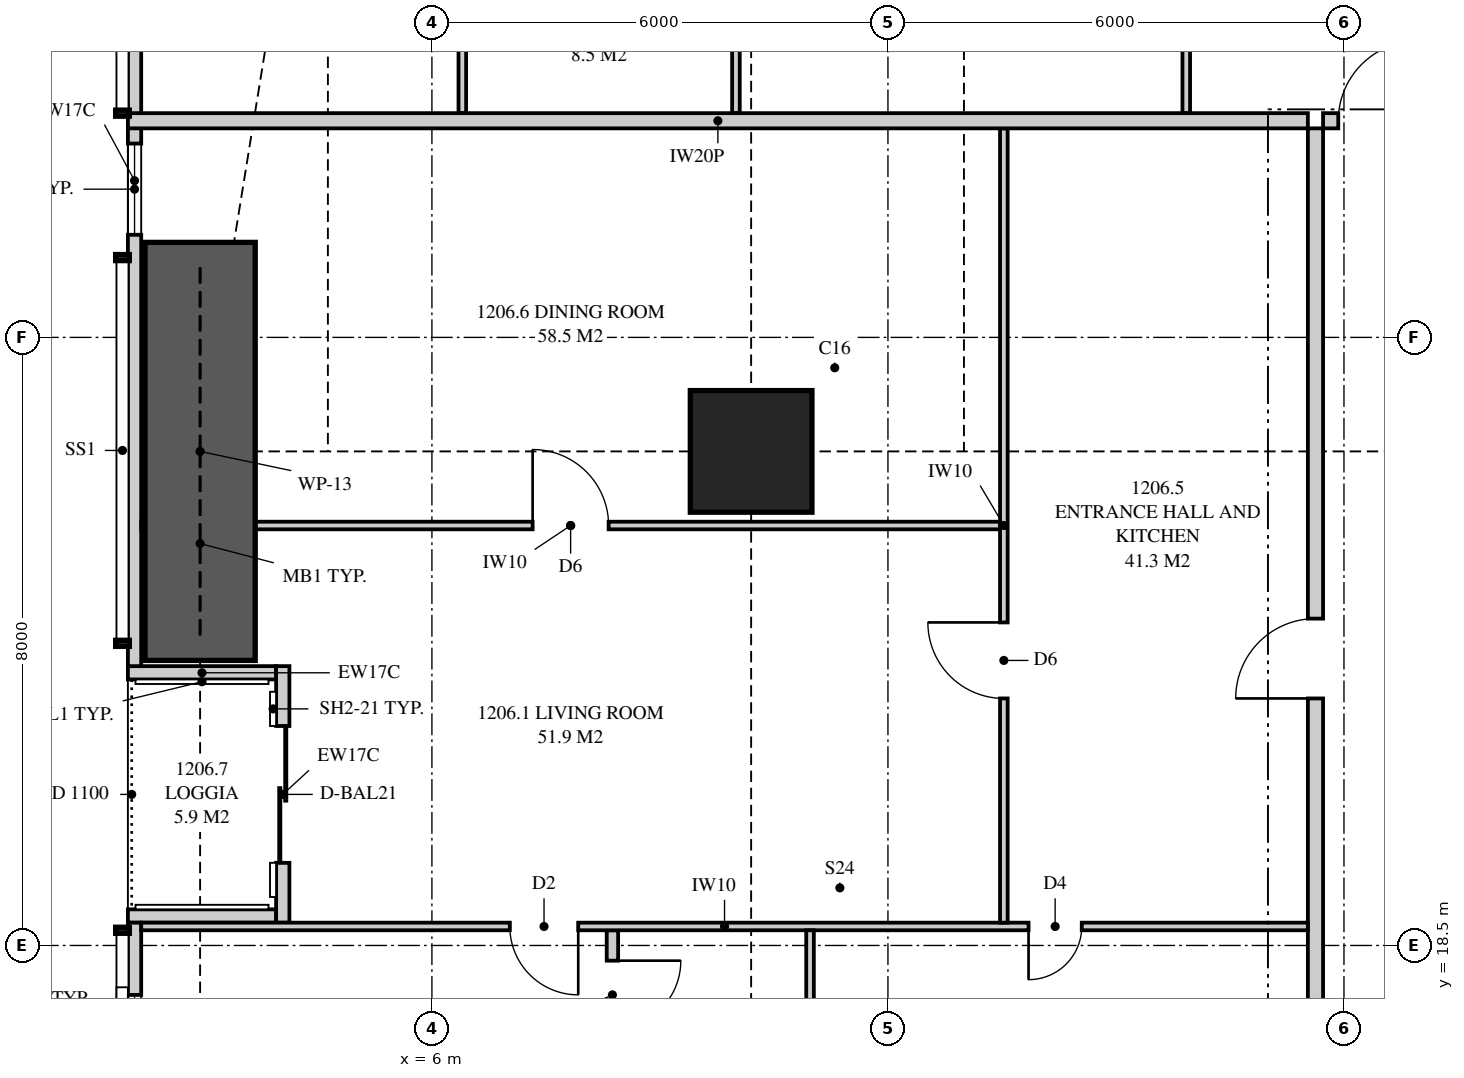
"""IFC4 building model, lengths in metres.
Left out: names, types, materials, properties, quantities, classifications, styles, units other than length and angle.
Written with IfcOpenShell. Run it as: python <this file> out.ifc"""

import sys

from ifc_helpers import new_model, si_unit, direction, frame, frame_2d, origin, origin_2d, place, context, subcontext, project, spatial, polyline, rectangle, outline, extrude, element, fill, save


model = new_model("IFC4")
c1 = context("Model", 3, precision=1e-05, world=origin(), true_north=direction((0.0, 1.0)))
c2 = subcontext(c1, "Body", "Model", "MODEL_VIEW")
j1 = project(units=[si_unit("LENGTHUNIT", "METRE"), si_unit("PLANEANGLEUNIT", "RADIAN")], contexts=[c1])
p1 = place(None, origin())
s1 = spatial("IfcSite", under=j1, at=p1, CompositionType="ELEMENT")
p2 = place(p1, origin())
s2 = spatial("IfcBuilding", under=s1, at=p2, CompositionType="ELEMENT")
p3 = place(p2, frame((0.0, 0.0, 47.8)))
s3 = spatial("IfcBuildingStorey", under=s2, at=p3, CompositionType="ELEMENT", Elevation=47.8)
p4 = place(p3, frame((10.2, 25.0, 0.0), z_axis=(0.0, 0.0, 1.0), x_axis=(1.0, 0.0, 0.0)))
e1 = element("IfcColumn", 1, at=p4, inside=s3, PredefinedType="COLUMN", context=c2, shape_type="SweptSolid", body=[
    extrude(rectangle(XDim=1.6, YDim=1.6, at=origin_2d()), origin(), (0.0, 0.0, 1.0), 3.35),
])
p5 = place(p3, frame((2.087, 34.949, 0.0), z_axis=(0.0, 0.0, 1.0), x_axis=(0.0, -1.0, 0.0)))
e2 = element("IfcWall", 2, at=p5, inside=s3, PredefinedType="SOLIDWALL", context=c2, shape_type="SweptSolid", body=[
    extrude(outline(polyline([(0.0, 0.0), (12.774, 0.0), (12.774, 2.15), (9.949, 2.15), (9.949, 3.11), (9.823, 3.11), (9.823, 2.15), (9.73, 2.15), (9.73, 3.11), (0.0, 3.11), (0.0, 0.0)])), frame((0.0, 0.087, 0.0), z_axis=(0.0, -1.0, 0.0), x_axis=(1.0, 0.0, 0.0)), (0.0, 0.0, 1.0), 0.175),
])
p6 = place(p5, frame((2.722, 0.0, 0.4)))
e3 = element("IfcOpeningElement", 3, at=p6, cuts=e2, PredefinedType="OPENING", context=c2, shape_type="SweptSolid", body=[
    extrude(rectangle(XDim=1.8, YDim=1.7, at=frame_2d((0.9, 0.85))), frame((0.0, 0.097, 0.0), z_axis=(0.0, -1.0, 0.0), x_axis=(1.0, 0.0, 0.0)), (0.0, 0.0, 1.0), 0.195),
])
p7 = place(p5, frame((5.899, 0.0, 0.4)))
e4 = element("IfcOpeningElement", 4, at=p7, cuts=e2, PredefinedType="OPENING", context=c2, shape_type="SweptSolid", body=[
    extrude(rectangle(XDim=1.2, YDim=1.7, at=frame_2d((0.6, 0.85))), frame((0.0, 0.097, 0.0), z_axis=(0.0, -1.0, 0.0), x_axis=(1.0, 0.0, 0.0)), (0.0, 0.0, 1.0), 0.195),
])
p8 = place(p3, frame((2.087, 18.8, 0.0), z_axis=(0.0, 0.0, 1.0), x_axis=(0.0, -1.0, 0.0)))
e5 = element("IfcWall", 5, at=p8, inside=s3, PredefinedType="SOLIDWALL", context=c2, shape_type="SweptSolid", body=[
    extrude(outline(polyline([(0.0, 0.0), (15.749, 0.0), (15.749, 3.11), (6.019, 3.11), (6.019, 2.15), (5.926, 2.15), (5.926, 3.11), (5.8, 3.11), (5.8, 2.15), (0.0, 2.15), (0.0, 0.0)])), frame((0.0, 0.087, 0.0), z_axis=(0.0, -1.0, 0.0), x_axis=(1.0, 0.0, 0.0)), (0.0, 0.0, 1.0), 0.175),
])
p9 = place(p8, frame((0.95, 0.0, 0.4)))
e6 = element("IfcOpeningElement", 6, at=p9, cuts=e5, PredefinedType="OPENING", context=c2, shape_type="SweptSolid", body=[
    extrude(rectangle(XDim=1.8, YDim=1.7, at=frame_2d((0.9, 0.85))), frame((0.0, 0.097, 0.0), z_axis=(0.0, -1.0, 0.0), x_axis=(1.0, 0.0, 0.0)), (0.0, 0.0, 1.0), 0.195),
])
p10 = place(p8, frame((8.69, 0.0, 0.4)))
e7 = element("IfcOpeningElement", 7, at=p10, cuts=e5, PredefinedType="OPENING", context=c2, shape_type="SweptSolid", body=[
    extrude(rectangle(XDim=1.2, YDim=1.7, at=frame_2d((0.6, 0.85))), frame((0.0, 0.097, 0.0), z_axis=(0.0, -1.0, 0.0), x_axis=(1.0, 0.0, 0.0)), (0.0, 0.0, 1.0), 0.195),
])
p11 = place(p8, frame((11.727, 0.0, 0.4)))
e8 = element("IfcOpeningElement", 8, at=p11, cuts=e5, PredefinedType="OPENING", context=c2, shape_type="SweptSolid", body=[
    extrude(rectangle(XDim=1.8, YDim=1.7, at=frame_2d((0.9, 0.85))), frame((0.0, 0.097, 0.0), z_axis=(0.0, -1.0, 0.0), x_axis=(1.0, 0.0, 0.0)), (0.0, 0.0, 1.0), 0.195),
])
p12 = place(p3, frame((4.038, 22.175, 0.0), z_axis=(0.0, 0.0, 1.0), x_axis=(0.0, -1.0, 0.0)))
e9 = element("IfcWall", 9, at=p12, inside=s3, PredefinedType="SOLIDWALL", context=c2, shape_type="SweptSolid", body=[
    extrude(rectangle(XDim=3.375, YDim=0.175, at=frame_2d((1.688, 0.0))), origin(), (0.0, 0.0, 1.0), 3.11),
])
p13 = place(p12, frame((0.788, 0.0, 0.0)))
e10 = element("IfcOpeningElement", 10, at=p13, cuts=e9, PredefinedType="OPENING", context=c2, shape_type="SweptSolid", body=[
    extrude(rectangle(XDim=1.8, YDim=2.1, at=frame_2d((0.9, 1.05))), frame((0.0, 0.097, 0.0), z_axis=(0.0, -1.0, 0.0), x_axis=(1.0, 0.0, 0.0)), (0.0, 0.0, 1.0), 0.195),
])
for number, where, z_axis, x_axis in (
    (11, (2.0, 22.087, 0.0), (0.0, 0.0, 1.0), (1.0, 0.0, 0.0)),
    (12, (2.0, 18.887, 0.0), (0.0, 0.0, 1.0), (1.0, 0.0, 0.0)),
):
    element("IfcWall", number, at=place(p3, frame(where, z_axis=z_axis, x_axis=x_axis)), inside=s3, PredefinedType="SOLIDWALL", context=c2, shape_type="SweptSolid", body=[
        extrude(outline(polyline([(0.0, 0.0), (1.95, 0.0), (1.95, 3.11), (1.75, 3.11), (1.75, 2.15), (0.15, 2.15), (0.15, 3.11), (0.0, 3.11), (0.0, 0.0)])), frame((0.0, 0.087, 0.0), z_axis=(0.0, -1.0, 0.0), x_axis=(1.0, 0.0, 0.0)), (0.0, 0.0, 1.0), 0.175),
    ])
p14 = place(p3, frame((17.725, 29.35, 0.0), z_axis=(0.0, 0.0, 1.0), x_axis=(1.0, 0.0, 0.0)))
e13 = element("IfcWall", 13, at=p14, inside=s3, PredefinedType="PARTITIONING", context=c2, shape_type="SweptSolid", body=[
    extrude(rectangle(XDim=4.075, YDim=0.2, at=frame_2d((2.038, 0.0))), origin(), (0.0, 0.0, 1.0), 3.11),
])
p15 = place(p14, frame((0.2, 0.0, 0.0)))
e14 = element("IfcOpeningElement", 14, at=p15, cuts=e13, PredefinedType="OPENING", context=c2, shape_type="SweptSolid", body=[
    extrude(rectangle(XDim=1.05, YDim=2.2, at=frame_2d((0.525, 1.1))), frame((0.0, 0.11, 0.0), z_axis=(0.0, -1.0, 0.0), x_axis=(1.0, 0.0, 0.0)), (0.0, 0.0, 1.0), 0.22),
])
p16 = place(p3, frame((6.4, 37.825, 0.0), z_axis=(0.0, 0.0, 1.0), x_axis=(0.0, -1.0, 0.0)))
e15 = element("IfcWall", 15, at=p16, inside=s3, PredefinedType="PARTITIONING", context=c2, shape_type="SweptSolid", body=[
    extrude(outline(polyline([(0.0, 0.0), (8.375, 0.0), (8.375, 3.11), (2.978, 3.11), (2.978, 2.15), (1.224, 2.15), (1.224, 3.11), (0.0, 3.11), (0.0, 0.0)])), frame((0.0, 0.05, 0.0), z_axis=(0.0, -1.0, 0.0), x_axis=(1.0, 0.0, 0.0)), (0.0, 0.0, 1.0), 0.1),
])
p17 = place(p16, frame((3.422, 0.0, 0.0)))
e16 = element("IfcOpeningElement", 16, at=p17, cuts=e15, PredefinedType="OPENING", context=c2, shape_type="SweptSolid", body=[
    extrude(rectangle(XDim=0.9, YDim=2.1, at=frame_2d((0.45, 1.05))), frame((0.0, 0.06, 0.0), z_axis=(0.0, -1.0, 0.0), x_axis=(1.0, 0.0, 0.0)), (0.0, 0.0, 1.0), 0.12),
])
p18 = place(p16, frame((6.023, 0.0, 0.0)))
e17 = element("IfcOpeningElement", 17, at=p18, cuts=e15, PredefinedType="OPENING", context=c2, shape_type="SweptSolid", body=[
    extrude(rectangle(XDim=0.9, YDim=2.1, at=frame_2d((0.45, 1.05))), frame((0.0, 0.06, 0.0), z_axis=(0.0, -1.0, 0.0), x_axis=(1.0, 0.0, 0.0)), (0.0, 0.0, 1.0), 0.12),
])
p19 = place(p3, frame((10.0, 36.487, 0.0), z_axis=(0.0, 0.0, 1.0), x_axis=(0.0, -1.0, 0.0)))
e18 = element("IfcWall", 18, at=p19, inside=s3, PredefinedType="PARTITIONING", context=c2, shape_type="SweptSolid", body=[
    extrude(outline(polyline([(0.0, 0.0), (7.037, 0.0), (7.037, 2.51), (0.917, 2.51), (0.917, 2.15), (0.0, 2.15), (0.0, 0.0)])), frame((0.0, 0.05, 0.0), z_axis=(0.0, -1.0, 0.0), x_axis=(1.0, 0.0, 0.0)), (0.0, 0.0, 1.0), 0.1),
])
p20 = place(p19, frame((3.188, 0.0, 0.0)))
e19 = element("IfcOpeningElement", 19, at=p20, cuts=e18, PredefinedType="OPENING", context=c2, shape_type="SweptSolid", body=[
    extrude(rectangle(XDim=0.9, YDim=2.1, at=frame_2d((0.45, 1.05))), frame((0.0, 0.06, 0.0), z_axis=(0.0, -1.0, 0.0), x_axis=(1.0, 0.0, 0.0)), (0.0, 0.0, 1.0), 0.12),
])
p21 = place(p19, frame((4.612, 0.0, 0.0)))
e20 = element("IfcOpeningElement", 20, at=p21, cuts=e18, PredefinedType="OPENING", context=c2, shape_type="SweptSolid", body=[
    extrude(rectangle(XDim=0.9, YDim=2.1, at=frame_2d((0.45, 1.05))), frame((0.0, 0.06, 0.0), z_axis=(0.0, -1.0, 0.0), x_axis=(1.0, 0.0, 0.0)), (0.0, 0.0, 1.0), 0.12),
])
p22 = place(p3, frame((15.925, 37.825, 0.0), z_axis=(0.0, 0.0, 1.0), x_axis=(0.0, -1.0, 0.0)))
e21 = element("IfcWall", 21, at=p22, inside=s3, PredefinedType="PARTITIONING", context=c2, shape_type="SweptSolid", body=[
    extrude(outline(polyline([(0.0, 0.0), (8.375, 0.0), (8.375, 3.11), (1.635, 3.11), (1.635, 2.15), (0.0, 2.15), (0.0, 3.11), (0.0, 0.0)])), frame((0.0, 0.05, 0.0), z_axis=(0.0, -1.0, 0.0), x_axis=(1.0, 0.0, 0.0)), (0.0, 0.0, 1.0), 0.1),
])
p23 = place(p22, frame((3.688, 0.0, 0.0)))
e22 = element("IfcOpeningElement", 22, at=p23, cuts=e21, PredefinedType="OPENING", context=c2, shape_type="SweptSolid", body=[
    extrude(rectangle(XDim=1.0, YDim=2.1, at=frame_2d((0.5, 1.05))), frame((0.0, 0.06, 0.0), z_axis=(0.0, -1.0, 0.0), x_axis=(1.0, 0.0, 0.0)), (0.0, 0.0, 1.0), 0.12),
])
p24 = place(p3, frame((2.0, 29.35, 0.0), z_axis=(0.0, 0.0, 1.0), x_axis=(1.0, 0.0, 0.0)))
e23 = element("IfcWall", 23, at=p24, inside=s3, PredefinedType="PARTITIONING", context=c2, shape_type="SweptSolid", body=[
    extrude(outline(polyline([(0.0, 0.0), (15.525, 0.0), (15.525, 3.11), (11.337, 3.11), (11.337, 2.541), (10.663, 2.541), (10.663, 3.11), (9.51, 3.11), (9.51, 2.51), (6.89, 2.51), (6.89, 3.11), (2.969, 3.11), (2.969, 2.541), (2.577, 2.541), (2.577, 2.15), (0.733, 2.15), (0.733, 3.11), (0.0, 3.11), (0.0, 0.0)])), frame((0.0, 0.1, 0.0), z_axis=(0.0, -1.0, 0.0), x_axis=(1.0, 0.0, 0.0)), (0.0, 0.0, 1.0), 0.2),
])
p25 = place(p3, frame((17.625, 15.25, 0.0), z_axis=(0.0, 0.0, 1.0), x_axis=(0.0, 1.0, 0.0)))
e24 = element("IfcWall", 24, at=p25, inside=s3, PredefinedType="PARTITIONING", context=c2, shape_type="SweptSolid", body=[
    extrude(outline(polyline([(0.0, 0.0), (14.0, 0.0), (14.0, 3.11), (10.087, 3.11), (10.087, 2.541), (9.413, 2.541), (9.413, 3.11), (0.0, 3.11), (0.0, 0.0)])), frame((0.0, 0.1, 0.0), z_axis=(0.0, -1.0, 0.0), x_axis=(1.0, 0.0, 0.0)), (0.0, 0.0, 1.0), 0.2),
])
p26 = place(p25, frame((6.5, 0.0, 0.0)))
e25 = element("IfcOpeningElement", 25, at=p26, cuts=e24, PredefinedType="OPENING", context=c2, shape_type="SweptSolid", body=[
    extrude(rectangle(XDim=1.05, YDim=2.2, at=frame_2d((0.525, 1.1))), frame((0.0, 0.11, 0.0), z_axis=(0.0, -1.0, 0.0), x_axis=(1.0, 0.0, 0.0)), (0.0, 0.0, 1.0), 0.22),
])
p27 = place(p3, frame((2.175, 18.75, 0.0), z_axis=(0.0, 0.0, 1.0), x_axis=(1.0, 0.0, 0.0)))
e26 = element("IfcWall", 26, at=p27, inside=s3, PredefinedType="PARTITIONING", context=c2, shape_type="SweptSolid", body=[
    extrude(outline(polyline([(0.0, 0.0), (15.35, 0.0), (15.35, 3.11), (9.285, 3.11), (9.285, 2.51), (6.765, 2.51), (6.765, 3.11), (1.635, 3.11), (1.635, 2.15), (0.0, 2.15), (0.0, 3.11), (0.0, 0.0)])), frame((0.0, 0.05, 0.0), z_axis=(0.0, -1.0, 0.0), x_axis=(1.0, 0.0, 0.0)), (0.0, 0.0, 1.0), 0.1),
])
p28 = place(p27, frame((4.85, 0.0, 0.0)))
e27 = element("IfcOpeningElement", 27, at=p28, cuts=e26, PredefinedType="OPENING", context=c2, shape_type="SweptSolid", body=[
    extrude(rectangle(XDim=0.9, YDim=2.1, at=frame_2d((0.45, 1.05))), frame((0.0, 0.06, 0.0), z_axis=(0.0, -1.0, 0.0), x_axis=(1.0, 0.0, 0.0)), (0.0, 0.0, 1.0), 0.12),
])
p29 = place(p27, frame((11.675, 0.0, 0.0)))
e28 = element("IfcOpeningElement", 28, at=p29, cuts=e26, PredefinedType="OPENING", context=c2, shape_type="SweptSolid", body=[
    extrude(rectangle(XDim=0.7, YDim=2.1, at=frame_2d((0.35, 1.05))), frame((0.0, 0.06, 0.0), z_axis=(0.0, -1.0, 0.0), x_axis=(1.0, 0.0, 0.0)), (0.0, 0.0, 1.0), 0.12),
])
p30 = place(p3, frame((8.375, 15.25, 0.0), z_axis=(0.0, 0.0, 1.0), x_axis=(0.0, 1.0, 0.0)))
e29 = element("IfcWall", 29, at=p30, inside=s3, PredefinedType="PLUMBINGWALL", context=c2, shape_type="SweptSolid", body=[
    extrude(rectangle(XDim=3.45, YDim=0.15, at=frame_2d((1.725, 0.0))), origin(), (0.0, 0.0, 1.0), 3.11),
])
p31 = place(p30, frame((2.15, 0.0, 0.0)))
e30 = element("IfcOpeningElement", 30, at=p31, cuts=e29, PredefinedType="OPENING", context=c2, shape_type="SweptSolid", body=[
    extrude(rectangle(XDim=0.9, YDim=2.1, at=frame_2d((0.45, 1.05))), frame((0.0, 0.085, 0.0), z_axis=(0.0, -1.0, 0.0), x_axis=(1.0, 0.0, 0.0)), (0.0, 0.0, 1.0), 0.17),
])
p32 = place(p3, frame((10.975, 15.25, 0.0), z_axis=(0.0, 0.0, 1.0), x_axis=(0.0, 1.0, 0.0)))
e31 = element("IfcWall", 31, at=p32, inside=s3, PredefinedType="PARTITIONING", context=c2, shape_type="SweptSolid", body=[
    extrude(outline(polyline([(0.0, 0.0), (3.45, 0.0), (3.45, 3.11), (3.45, 2.51), (0.0, 2.51), (0.0, 3.11), (0.0, 0.0)])), frame((0.0, 0.05, 0.0), z_axis=(0.0, -1.0, 0.0), x_axis=(1.0, 0.0, 0.0)), (0.0, 0.0, 1.0), 0.1),
])
p33 = place(p3, frame((13.525, 18.8, 0.0), z_axis=(0.0, 0.0, 1.0), x_axis=(0.0, 1.0, 0.0)))
e32 = element("IfcWall", 32, at=p33, inside=s3, PredefinedType="PARTITIONING", context=c2, shape_type="SweptSolid", body=[
    extrude(outline(polyline([(0.0, 0.0), (10.45, 0.0), (10.45, 3.11), (6.487, 3.11), (6.487, 2.541), (5.913, 2.541), (5.913, 3.11), (0.0, 3.11), (0.0, 0.0)])), frame((0.0, 0.05, 0.0), z_axis=(0.0, -1.0, 0.0), x_axis=(1.0, 0.0, 0.0)), (0.0, 0.0, 1.0), 0.1),
])
p34 = place(p33, frame((2.95, 0.0, 0.0)))
e33 = element("IfcOpeningElement", 33, at=p34, cuts=e32, PredefinedType="OPENING", context=c2, shape_type="SweptSolid", body=[
    extrude(rectangle(XDim=1.0, YDim=2.1, at=frame_2d((0.5, 1.05))), frame((0.0, 0.06, 0.0), z_axis=(0.0, -1.0, 0.0), x_axis=(1.0, 0.0, 0.0)), (0.0, 0.0, 1.0), 0.12),
])
p35 = place(p3, frame((2.175, 24.025, 0.0), z_axis=(0.0, 0.0, 1.0), x_axis=(1.0, 0.0, 0.0)))
e34 = element("IfcWall", 34, at=p35, inside=s3, PredefinedType="PARTITIONING", context=c2, shape_type="SweptSolid", body=[
    extrude(outline(polyline([(0.529, 2.15), (0.0, 2.15), (0.0, 0.0), (0.529, 0.0), (0.529, 0.798), (1.021, 0.798), (1.021, 0.0), (11.3, 0.0), (11.3, 3.11), (9.285, 3.11), (9.285, 2.51), (6.765, 2.51), (6.765, 3.11), (1.635, 3.11), (1.635, 2.15), (1.021, 2.15), (1.021, 1.352), (0.529, 1.352), (0.529, 2.15)])), frame((0.0, 0.05, 0.0), z_axis=(0.0, -1.0, 0.0), x_axis=(1.0, 0.0, 0.0)), (0.0, 0.0, 1.0), 0.1),
])
p36 = place(p35, frame((5.15, 0.0, 0.0)))
e35 = element("IfcOpeningElement", 35, at=p36, cuts=e34, PredefinedType="OPENING", context=c2, shape_type="SweptSolid", body=[
    extrude(rectangle(XDim=1.0, YDim=2.1, at=frame_2d((0.5, 1.05))), frame((0.0, 0.06, 0.0), z_axis=(0.0, -1.0, 0.0), x_axis=(1.0, 0.0, 0.0)), (0.0, 0.0, 1.0), 0.12),
])
p37 = place(p3, frame((2.95, 22.25, 0.0), z_axis=(0.0, 0.0, 1.0), x_axis=(0.0, 1.0, 0.0)))
e36 = element("IfcWall", 36, at=p37, inside=s3, PredefinedType="SHEAR", context=c2, shape_type="SweptSolid", body=[
    extrude(rectangle(XDim=5.5, YDim=1.45, at=frame_2d((2.75, 0.0))), origin(), (0.0, 0.0, 1.0), 3.35),
])
p38 = place(p7, origin())
e37 = element("IfcWindow", 37, at=p38, inside=s3, PartitioningType="SINGLE_PANEL", PredefinedType="WINDOW", context=c2, shape_type="SweptSolid", body=[
    extrude(rectangle(XDim=1.2, YDim=1.7, at=frame_2d((0.6, 0.85))), frame((0.0, 0.03, 0.0), z_axis=(0.0, -1.0, 0.0), x_axis=(1.0, 0.0, 0.0)), (0.0, 0.0, 1.0), 0.06),
])
fill(e4, e37)
p39 = place(p13, origin())
e38 = element("IfcDoor", 38, at=p39, inside=s3, OperationType="SLIDING_TO_LEFT", PredefinedType="DOOR", context=c2, shape_type="SweptSolid", body=[
    extrude(rectangle(XDim=1.8, YDim=2.1, at=frame_2d((0.9, 1.05))), frame((0.0, 0.025, 0.0), z_axis=(0.0, -1.0, 0.0), x_axis=(1.0, 0.0, 0.0)), (0.0, 0.0, 1.0), 0.05),
])
fill(e10, e38)
p40 = place(p9, origin())
e39 = element("IfcWindow", 39, at=p40, inside=s3, PartitioningType="SINGLE_PANEL", PredefinedType="WINDOW", context=c2, shape_type="SweptSolid", body=[
    extrude(rectangle(XDim=1.8, YDim=1.7, at=frame_2d((0.9, 0.85))), frame((0.0, 0.03, 0.0), z_axis=(0.0, -1.0, 0.0), x_axis=(1.0, 0.0, 0.0)), (0.0, 0.0, 1.0), 0.06),
])
fill(e6, e39)
p41 = place(p15, origin())
e40 = element("IfcDoor", 40, at=p41, inside=s3, OperationType="SINGLE_SWING_RIGHT", PredefinedType="DOOR", context=c2, shape_type="SweptSolid", body=[
    extrude(rectangle(XDim=1.05, YDim=2.2, at=frame_2d((0.525, 1.1))), frame((0.0, 0.025, 0.0), z_axis=(0.0, -1.0, 0.0), x_axis=(1.0, 0.0, 0.0)), (0.0, 0.0, 1.0), 0.05),
])
fill(e14, e40)
p42 = place(p26, origin())
e41 = element("IfcDoor", 41, at=p42, inside=s3, OperationType="SINGLE_SWING_LEFT", PredefinedType="DOOR", context=c2, shape_type="SweptSolid", body=[
    extrude(rectangle(XDim=1.05, YDim=2.2, at=frame_2d((0.525, 1.1))), frame((0.0, 0.025, 0.0), z_axis=(0.0, -1.0, 0.0), x_axis=(1.0, 0.0, 0.0)), (0.0, 0.0, 1.0), 0.05),
])
fill(e25, e41)
p43 = place(p28, frame((0.9, 0.0, 0.0), z_axis=(0.0, 0.0, 1.0), x_axis=(-1.0, 0.0, 0.0)))
e42 = element("IfcDoor", 42, at=p43, inside=s3, OperationType="SINGLE_SWING_LEFT", PredefinedType="DOOR", context=c2, shape_type="SweptSolid", body=[
    extrude(rectangle(XDim=0.9, YDim=2.1, at=frame_2d((0.45, 1.05))), frame((0.0, 0.025, 0.0), z_axis=(0.0, -1.0, 0.0), x_axis=(1.0, 0.0, 0.0)), (0.0, 0.0, 1.0), 0.05),
])
fill(e27, e42)
p44 = place(p31, frame((0.9, 0.0, 0.0), z_axis=(0.0, 0.0, 1.0), x_axis=(-1.0, 0.0, 0.0)))
e43 = element("IfcDoor", 43, at=p44, inside=s3, OperationType="SINGLE_SWING_LEFT", PredefinedType="DOOR", context=c2, shape_type="SweptSolid", body=[
    extrude(rectangle(XDim=0.9, YDim=2.1, at=frame_2d((0.45, 1.05))), frame((0.0, 0.025, 0.0), z_axis=(0.0, -1.0, 0.0), x_axis=(1.0, 0.0, 0.0)), (0.0, 0.0, 1.0), 0.05),
])
fill(e30, e43)
p45 = place(p29, frame((0.7, 0.0, 0.0), z_axis=(0.0, 0.0, 1.0), x_axis=(-1.0, 0.0, 0.0)))
e44 = element("IfcDoor", 44, at=p45, inside=s3, OperationType="SINGLE_SWING_RIGHT", PredefinedType="DOOR", context=c2, shape_type="SweptSolid", body=[
    extrude(rectangle(XDim=0.7, YDim=2.1, at=frame_2d((0.35, 1.05))), frame((0.0, 0.025, 0.0), z_axis=(0.0, -1.0, 0.0), x_axis=(1.0, 0.0, 0.0)), (0.0, 0.0, 1.0), 0.05),
])
fill(e28, e44)
p46 = place(p34, origin())
e45 = element("IfcDoor", 45, at=p46, inside=s3, OperationType="SINGLE_SWING_RIGHT", PredefinedType="DOOR", context=c2, shape_type="SweptSolid", body=[
    extrude(rectangle(XDim=1.0, YDim=2.1, at=frame_2d((0.5, 1.05))), frame((0.0, 0.025, 0.0), z_axis=(0.0, -1.0, 0.0), x_axis=(1.0, 0.0, 0.0)), (0.0, 0.0, 1.0), 0.05),
])
fill(e33, e45)
p47 = place(p36, origin())
e46 = element("IfcDoor", 46, at=p47, inside=s3, OperationType="SINGLE_SWING_LEFT", PredefinedType="DOOR", context=c2, shape_type="SweptSolid", body=[
    extrude(rectangle(XDim=1.0, YDim=2.1, at=frame_2d((0.5, 1.05))), frame((0.0, 0.025, 0.0), z_axis=(0.0, -1.0, 0.0), x_axis=(1.0, 0.0, 0.0)), (0.0, 0.0, 1.0), 0.05),
])
fill(e35, e46)
save(model, sys.argv[1])
